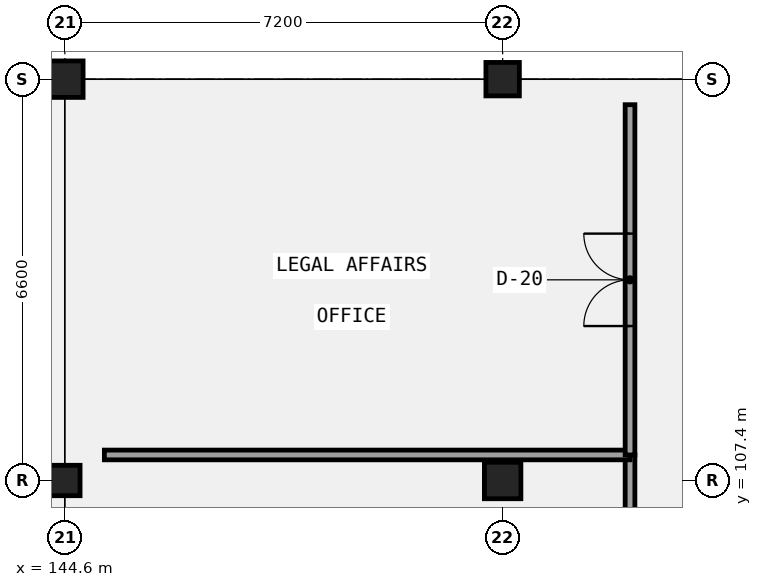
"""IFC4 building model, lengths in metres.
Left out: names, types, materials, properties, quantities, classifications, styles, units other than length and angle.
Written with IfcOpenShell. Run it as: python <this file> out.ifc"""

import sys

from ifc_helpers import new_model, si_unit, direction, frame, frame_2d, origin, origin_2d, place, context, subcontext, project, spatial, rectangle, extrude, element, fill, save


model = new_model("IFC4")
c1 = context("Model", 3, precision=1e-05, world=origin(), true_north=direction((0.0, 1.0)))
c2 = subcontext(c1, "Body", "Model", "MODEL_VIEW")
j1 = project(units=[si_unit("LENGTHUNIT", "METRE"), si_unit("PLANEANGLEUNIT", "RADIAN")], contexts=[c1])
p1 = place(None, origin())
s1 = spatial("IfcSite", under=j1, at=p1, CompositionType="ELEMENT")
p2 = place(p1, origin())
s2 = spatial("IfcBuilding", under=s1, at=p2, CompositionType="ELEMENT")
p3 = place(p2, frame((0.0, 0.0, 22.2)))
s3 = spatial("IfcBuildingStorey", under=s2, at=p3, CompositionType="ELEMENT", Elevation=22.2)
p4 = place(p3, frame((144.6, 107.4, 0.0), z_axis=(0.0, 0.0, 1.0), x_axis=(1.0, 0.0, 0.0)))
e1 = element("IfcColumn", 1, at=p4, inside=s3, PredefinedType="COLUMN", context=c2, shape_type="SweptSolid", body=[
    extrude(rectangle(XDim=0.5, YDim=0.5, at=origin_2d()), origin(), (0.0, 0.0, 1.0), 4.2),
])
for number, where, z_axis, x_axis in (
    (2, (144.6, 114.0, 0.0), (0.0, 0.0, 1.0), (1.0, 0.0, 0.0)),
    (3, (151.8, 107.4, 0.0), (0.0, 0.0, 1.0), (1.0, 0.0, 0.0)),
):
    element("IfcColumn", number, at=place(p3, frame(where, z_axis=z_axis, x_axis=x_axis)), inside=s3, PredefinedType="COLUMN", context=c2, shape_type="SweptSolid", body=[
        extrude(rectangle(XDim=0.6, YDim=0.6, at=origin_2d()), origin(), (0.0, 0.0, 1.0), 4.2),
    ])
p5 = place(p3, frame((151.8, 114.0, 0.0), z_axis=(0.0, 0.0, 1.0), x_axis=(1.0, 0.0, 0.0)))
e4 = element("IfcColumn", 4, at=p5, inside=s3, PredefinedType="COLUMN", context=c2, shape_type="SweptSolid", body=[
    extrude(rectangle(XDim=0.55, YDim=0.55, at=origin_2d()), origin(), (0.0, 0.0, 1.0), 4.2),
])
p6 = place(p3, frame((144.75, 114.0, 0.0), z_axis=(0.0, 0.0, 1.0), x_axis=(-1.0, 0.0, 0.0)))
e5 = element("IfcWall", 5, at=p6, inside=s3, PredefinedType="SOLIDWALL", context=c2, shape_type="SweptSolid", body=[
    extrude(rectangle(XDim=36.3, YDim=0.3, at=frame_2d((18.15, 0.0))), origin(), (0.0, 0.0, 1.0), 3.17),
])
p7 = place(p6, frame((31.45, 0.0, 0.95)))
e6 = element("IfcOpeningElement", 6, at=p7, cuts=e5, PredefinedType="OPENING", context=c2, shape_type="SweptSolid", body=[
    extrude(rectangle(XDim=2.2, YDim=1.65, at=frame_2d((1.1, 0.825))), frame((0.0, 0.16, 0.0), z_axis=(0.0, -1.0, 0.0), x_axis=(1.0, 0.0, 0.0)), (0.0, 0.0, 1.0), 0.32),
])
p8 = place(p6, frame((24.25, 0.0, 0.95)))
e7 = element("IfcOpeningElement", 7, at=p8, cuts=e5, PredefinedType="OPENING", context=c2, shape_type="SweptSolid", body=[
    extrude(rectangle(XDim=2.2, YDim=1.9, at=frame_2d((1.1, 0.95))), frame((0.0, 0.16, 0.0), z_axis=(0.0, -1.0, 0.0), x_axis=(1.0, 0.0, 0.0)), (0.0, 0.0, 1.0), 0.32),
])
p9 = place(p6, frame((16.925, 0.0, 0.95)))
e8 = element("IfcOpeningElement", 8, at=p9, cuts=e5, PredefinedType="OPENING", context=c2, shape_type="SweptSolid", body=[
    extrude(rectangle(XDim=2.45, YDim=1.4, at=frame_2d((1.225, 0.7))), frame((0.0, 0.16, 0.0), z_axis=(0.0, -1.0, 0.0), x_axis=(1.0, 0.0, 0.0)), (0.0, 0.0, 1.0), 0.32),
])
p10 = place(p6, frame((9.725, 0.0, 0.95)))
e9 = element("IfcOpeningElement", 9, at=p10, cuts=e5, PredefinedType="OPENING", context=c2, shape_type="SweptSolid", body=[
    extrude(rectangle(XDim=2.45, YDim=1.65, at=frame_2d((1.225, 0.825))), frame((0.0, 0.16, 0.0), z_axis=(0.0, -1.0, 0.0), x_axis=(1.0, 0.0, 0.0)), (0.0, 0.0, 1.0), 0.32),
])
p11 = place(p6, frame((2.525, 0.0, 0.95)))
e10 = element("IfcOpeningElement", 10, at=p11, cuts=e5, PredefinedType="OPENING", context=c2, shape_type="SweptSolid", body=[
    extrude(rectangle(XDim=2.45, YDim=1.9, at=frame_2d((1.225, 0.95))), frame((0.0, 0.16, 0.0), z_axis=(0.0, -1.0, 0.0), x_axis=(1.0, 0.0, 0.0)), (0.0, 0.0, 1.0), 0.32),
])
p12 = place(p3, frame((153.895, 102.06, 0.0), z_axis=(0.0, 0.0, 1.0), x_axis=(0.0, 1.0, 0.0)))
e11 = element("IfcWall", 11, at=p12, inside=s3, PredefinedType="PARTITIONING", context=c2, shape_type="SweptSolid", body=[
    extrude(rectangle(XDim=5.76, YDim=0.16, at=frame_2d((2.88, 0.0))), origin(), (0.0, 0.0, 1.0), 3.92),
])
p13 = place(p12, frame((2.12, 0.0, 0.0)))
e12 = element("IfcOpeningElement", 12, at=p13, cuts=e11, PredefinedType="OPENING", context=c2, shape_type="SweptSolid", body=[
    extrude(rectangle(XDim=1.52, YDim=2.1, at=frame_2d((0.76, 1.05))), frame((0.0, 0.09, 0.0), z_axis=(0.0, -1.0, 0.0), x_axis=(1.0, 0.0, 0.0)), (0.0, 0.0, 1.0), 0.18),
])
p14 = place(p3, frame((145.25, 107.82, 0.0), z_axis=(0.0, 0.0, 1.0), x_axis=(1.0, 0.0, 0.0)))
e13 = element("IfcWall", 13, at=p14, inside=s3, PredefinedType="PARTITIONING", context=c2, shape_type="SweptSolid", body=[
    extrude(rectangle(XDim=8.645, YDim=0.16, at=frame_2d((4.323, 0.0))), origin(), (0.0, 0.0, 1.0), 3.92),
])
p15 = place(p3, frame((153.895, 107.82, 0.0), z_axis=(0.0, 0.0, 1.0), x_axis=(0.0, 1.0, 0.0)))
e14 = element("IfcWall", 14, at=p15, inside=s3, PredefinedType="PARTITIONING", context=c2, shape_type="SweptSolid", body=[
    extrude(rectangle(XDim=5.76, YDim=0.16, at=frame_2d((2.88, 0.0))), origin(), (0.0, 0.0, 1.0), 3.92),
])
p16 = place(p15, frame((2.12, 0.0, 0.0)))
e15 = element("IfcOpeningElement", 15, at=p16, cuts=e14, PredefinedType="OPENING", context=c2, shape_type="SweptSolid", body=[
    extrude(rectangle(XDim=1.52, YDim=2.22, at=frame_2d((0.76, 1.11))), frame((0.0, 0.09, 0.0), z_axis=(0.0, -1.0, 0.0), x_axis=(1.0, 0.0, 0.0)), (0.0, 0.0, 1.0), 0.18),
])
p17 = place(p16, frame((1.52, 0.0, 0.0), z_axis=(0.0, 0.0, 1.0), x_axis=(-1.0, 0.0, 0.0)))
e16 = element("IfcDoor", 16, at=p17, inside=s3, OperationType="DOUBLE_DOOR_SINGLE_SWING", PredefinedType="DOOR", context=c2, shape_type="SweptSolid", body=[
    extrude(rectangle(XDim=1.52, YDim=2.22, at=frame_2d((0.76, 1.11))), frame((0.0, 0.025, 0.0), z_axis=(0.0, -1.0, 0.0), x_axis=(1.0, 0.0, 0.0)), (0.0, 0.0, 1.0), 0.05),
])
fill(e15, e16)
save(model, sys.argv[1])
